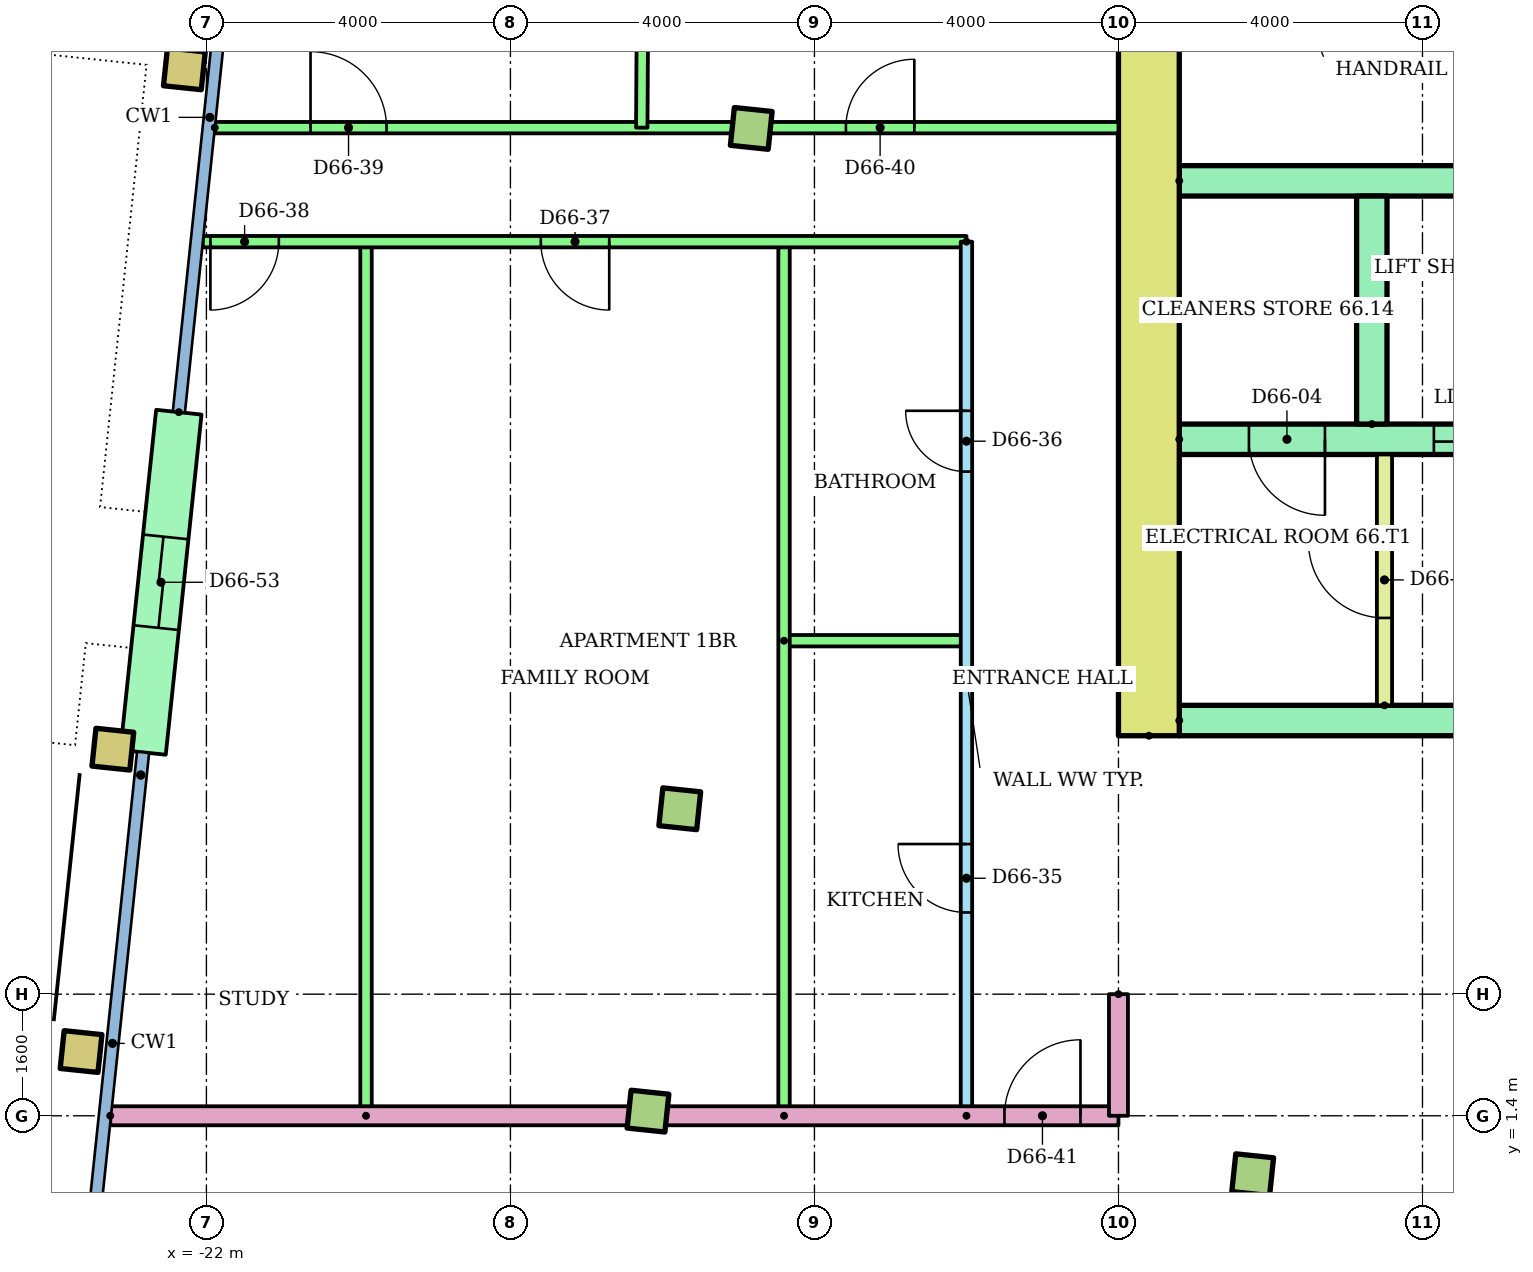
"""IFC4 building model, lengths in metres.
Left out: names, types, materials, properties, quantities, classifications, styles, units other than length and angle.
Written with IfcOpenShell. Run it as: python <this file> out.ifc"""

import sys

from ifc_helpers import new_model, si_unit, direction, frame, frame_2d, origin, origin_2d, place, context, subcontext, project, spatial, rectangle, hollow_rectangle, extrude, element, fill, save


model = new_model("IFC4")
c1 = context("Model", 3, precision=1e-05, world=origin(), true_north=direction((0.0, 1.0)))
c2 = subcontext(c1, "Body", "Model", "MODEL_VIEW")
j1 = project(units=[si_unit("LENGTHUNIT", "METRE"), si_unit("PLANEANGLEUNIT", "RADIAN")], contexts=[c1])
p1 = place(None, origin())
s1 = spatial("IfcSite", under=j1, at=p1, CompositionType="ELEMENT")
p2 = place(p1, origin())
s2 = spatial("IfcBuilding", under=s1, at=p2, CompositionType="ELEMENT")
p3 = place(p2, frame((0.0, 0.0, 256.3)))
s3 = spatial("IfcBuildingStorey", under=s2, at=p3, CompositionType="ELEMENT", Elevation=256.3)
p4 = place(p3, frame((-23.649, 2.245, 0.0), z_axis=(0.0, 0.0, 1.0), x_axis=(0.994521895368, -0.104528463268, 0.0)))
e1 = element("IfcColumn", 1, at=p4, inside=s3, PredefinedType="COLUMN", context=c2, shape_type="SweptSolid", body=[
    extrude(hollow_rectangle(XDim=0.5, YDim=0.5, WallThickness=0.025, at=origin_2d()), origin(), (0.0, 0.0, 1.0), 3.2),
])
for number, where, z_axis, x_axis in (
    (2, (-16.19, 1.461, 0.0), (0.0, 0.0, 1.0), (0.995, -0.105, 0.0)),
    (3, (-8.234, 0.625, 0.0), (0.0, 0.0, 1.0), (0.995, -0.105, 0.0)),
):
    element("IfcColumn", number, at=place(p3, frame(where, z_axis=z_axis, x_axis=x_axis)), inside=s3, PredefinedType="COLUMN", context=c2, shape_type="SweptSolid", body=[
        extrude(rectangle(XDim=0.5, YDim=0.5, at=origin_2d()), origin(), (0.0, 0.0, 1.0), 3.2),
    ])
p5 = place(p3, frame((-23.231, 6.223, 0.0), z_axis=(0.0, 0.0, 1.0), x_axis=(0.994521895368, -0.104528463268, 0.0)))
e4 = element("IfcColumn", 4, at=p5, inside=s3, PredefinedType="COLUMN", context=c2, shape_type="SweptSolid", body=[
    extrude(hollow_rectangle(XDim=0.5, YDim=0.5, WallThickness=0.025, at=origin_2d()), origin(), (0.0, 0.0, 1.0), 3.2),
])
p6 = place(p3, frame((-15.772, 5.439, 0.0), z_axis=(0.0, 0.0, 1.0), x_axis=(0.994521895368, -0.104528463268, 0.0)))
e5 = element("IfcColumn", 5, at=p6, inside=s3, PredefinedType="COLUMN", context=c2, shape_type="SweptSolid", body=[
    extrude(rectangle(XDim=0.5, YDim=0.5, at=origin_2d()), origin(), (0.0, 0.0, 1.0), 3.2),
])
p7 = place(p3, frame((-22.29, 15.174, 0.0), z_axis=(0.0, 0.0, 1.0), x_axis=(0.994521895368, -0.104528463268, 0.0)))
e6 = element("IfcColumn", 6, at=p7, inside=s3, PredefinedType="COLUMN", context=c2, shape_type="SweptSolid", body=[
    extrude(hollow_rectangle(XDim=0.5, YDim=0.5, WallThickness=0.025, at=origin_2d()), origin(), (0.0, 0.0, 1.0), 3.2),
])
p8 = place(p3, frame((-14.831, 14.39, 0.0), z_axis=(0.0, 0.0, 1.0), x_axis=(0.994521895368, -0.104528463268, 0.0)))
e7 = element("IfcColumn", 7, at=p8, inside=s3, PredefinedType="COLUMN", context=c2, shape_type="SweptSolid", body=[
    extrude(rectangle(XDim=0.5, YDim=0.5, at=origin_2d()), origin(), (0.0, 0.0, 1.0), 3.2),
])
p9 = place(p3, frame((-22.363, 10.657, 0.0), z_axis=(0.0, 0.0, 1.0), x_axis=(-0.104492739125, -0.994525649478, 0.0)))
e8 = element("IfcWall", 8, at=p9, inside=s3, PredefinedType="STANDARD", context=c2, shape_type="SweptSolid", body=[
    extrude(rectangle(XDim=4.5, YDim=0.6, at=frame_2d((2.25, 0.0))), origin(), (0.0, 0.0, 1.0), 2.92),
])
p10 = place(p9, frame((1.65, 0.0, 0.0)))
e9 = element("IfcOpeningElement", 9, at=p10, cuts=e8, PredefinedType="OPENING", context=c2, shape_type="SweptSolid", body=[
    extrude(rectangle(XDim=1.2, YDim=2.1, at=frame_2d((0.6, 1.05))), frame((0.0, 0.31, 0.0), z_axis=(0.0, -1.0, 0.0), x_axis=(1.0, 0.0, 0.0)), (0.0, 0.0, 1.0), 0.62),
])
p11 = place(p3, frame((-9.6, 6.4, 0.0), z_axis=(0.0, 0.0, 1.0), x_axis=(0.0, 1.0, 0.0)))
e10 = element("IfcWall", 10, at=p11, inside=s3, PredefinedType="SHEAR", context=c2, shape_type="SweptSolid", body=[
    extrude(rectangle(XDim=13.6, YDim=0.8, at=frame_2d((6.8, 0.0))), origin(), (0.0, 0.0, 1.0), 2.92),
])
p12 = place(p3, frame((-9.2, 6.6, 0.0)))
e11 = element("IfcWall", 11, at=p12, inside=s3, PredefinedType="SHEAR", context=c2, shape_type="SweptSolid", body=[
    extrude(rectangle(XDim=18.4, YDim=0.4, at=frame_2d((9.2, 0.0))), origin(), (0.0, 0.0, 1.0), 2.92),
])
p13 = place(p12, frame((8.3, 0.0, 0.0)))
e12 = element("IfcOpeningElement", 12, at=p13, cuts=e11, PredefinedType="OPENING", context=c2, shape_type="SweptSolid", body=[
    extrude(rectangle(XDim=1.8, YDim=2.1, at=frame_2d((0.9, 1.05))), frame((0.0, 0.21, 0.0), z_axis=(0.0, -1.0, 0.0), x_axis=(1.0, 0.0, 0.0)), (0.0, 0.0, 1.0), 0.42),
])
p14 = place(p12, frame((3.8, 0.0, 0.0)))
e13 = element("IfcOpeningElement", 13, at=p14, cuts=e11, PredefinedType="OPENING", context=c2, shape_type="SweptSolid", body=[
    extrude(rectangle(XDim=1.8, YDim=2.1, at=frame_2d((0.9, 1.05))), frame((0.0, 0.21, 0.0), z_axis=(0.0, -1.0, 0.0), x_axis=(1.0, 0.0, 0.0)), (0.0, 0.0, 1.0), 0.42),
])
p15 = place(p12, frame((12.8, 0.0, 0.0)))
e14 = element("IfcOpeningElement", 14, at=p15, cuts=e11, PredefinedType="OPENING", context=c2, shape_type="SweptSolid", body=[
    extrude(rectangle(XDim=1.8, YDim=2.1, at=frame_2d((0.9, 1.05))), frame((0.0, 0.21, 0.0), z_axis=(0.0, -1.0, 0.0), x_axis=(1.0, 0.0, 0.0)), (0.0, 0.0, 1.0), 0.42),
])
p16 = place(p3, frame((-9.2, 10.3, 0.0)))
e15 = element("IfcWall", 15, at=p16, inside=s3, PredefinedType="SHEAR", context=c2, shape_type="SweptSolid", body=[
    extrude(rectangle(XDim=8.0, YDim=0.4, at=frame_2d((4.0, 0.0))), origin(), (0.0, 0.0, 1.0), 2.92),
])
p17 = place(p16, frame((3.35, 0.0, 0.0)))
e16 = element("IfcOpeningElement", 16, at=p17, cuts=e15, PredefinedType="OPENING", context=c2, shape_type="SweptSolid", body=[
    extrude(rectangle(XDim=1.1, YDim=2.1, at=frame_2d((0.55, 1.05))), frame((0.0, 0.21, 0.0), z_axis=(0.0, -1.0, 0.0), x_axis=(1.0, 0.0, 0.0)), (0.0, 0.0, 1.0), 0.42),
])
p18 = place(p16, frame((6.083, 0.0, 0.0)))
e17 = element("IfcOpeningElement", 17, at=p18, cuts=e15, PredefinedType="OPENING", context=c2, shape_type="SweptSolid", body=[
    extrude(rectangle(XDim=1.1, YDim=2.1, at=frame_2d((0.55, 1.05))), frame((0.0, 0.21, 0.0), z_axis=(0.0, -1.0, 0.0), x_axis=(1.0, 0.0, 0.0)), (0.0, 0.0, 1.0), 0.42),
])
p19 = place(p16, frame((0.917, 0.0, 0.0)))
e18 = element("IfcOpeningElement", 18, at=p19, cuts=e15, PredefinedType="OPENING", context=c2, shape_type="SweptSolid", body=[
    extrude(rectangle(XDim=1.0, YDim=2.1, at=frame_2d((0.5, 1.05))), frame((0.0, 0.21, 0.0), z_axis=(0.0, -1.0, 0.0), x_axis=(1.0, 0.0, 0.0)), (0.0, 0.0, 1.0), 0.42),
])
p20 = place(p3, frame((-9.2, 13.7, 0.0)))
e19 = element("IfcWall", 19, at=p20, inside=s3, PredefinedType="SHEAR", context=c2, shape_type="SweptSolid", body=[
    extrude(rectangle(XDim=8.0, YDim=0.4, at=frame_2d((4.0, 0.0))), origin(), (0.0, 0.0, 1.0), 2.92),
])
p21 = place(p3, frame((-6.667, 10.5, 0.0), z_axis=(0.0, 0.0, 1.0), x_axis=(0.0, 1.0, 0.0)))
e20 = element("IfcWall", 20, at=p21, inside=s3, PredefinedType="SHEAR", context=c2, shape_type="SweptSolid", body=[
    extrude(rectangle(XDim=3.0, YDim=0.4, at=frame_2d((1.5, 0.0))), origin(), (0.0, 0.0, 1.0), 2.92),
])
p22 = place(p3, frame((-6.5, 6.8, 0.0), z_axis=(0.0, 0.0, 1.0), x_axis=(0.0, 1.0, 0.0)))
e21 = element("IfcWall", 21, at=p22, inside=s3, PredefinedType="PARTITIONING", context=c2, shape_type="SweptSolid", body=[
    extrude(rectangle(XDim=3.3, YDim=0.2, at=frame_2d((1.65, 0.0))), origin(), (0.0, 0.0, 1.0), 2.92),
])
p23 = place(p22, frame((1.15, 0.0, 0.0)))
e22 = element("IfcOpeningElement", 22, at=p23, cuts=e21, PredefinedType="OPENING", context=c2, shape_type="SweptSolid", body=[
    extrude(rectangle(XDim=1.0, YDim=2.1, at=frame_2d((0.5, 1.05))), frame((0.0, 0.11, 0.0), z_axis=(0.0, -1.0, 0.0), x_axis=(1.0, 0.0, 0.0)), (0.0, 0.0, 1.0), 0.22),
])
p24 = place(p3, frame((-12.0, 1.4, 0.0), z_axis=(0.0, 0.0, 1.0), x_axis=(0.0, 1.0, 0.0)))
e23 = element("IfcWall", 23, at=p24, inside=s3, PredefinedType="PARTITIONING", context=c2, shape_type="SweptSolid", body=[
    extrude(rectangle(XDim=11.5, YDim=0.15, at=frame_2d((5.75, 0.0))), origin(), (0.0, 0.0, 1.0), 2.4),
])
p25 = place(p24, frame((2.675, 0.0, 0.0)))
e24 = element("IfcOpeningElement", 24, at=p25, cuts=e23, PredefinedType="OPENING", context=c2, shape_type="SweptSolid", body=[
    extrude(rectangle(XDim=0.9, YDim=2.1, at=frame_2d((0.45, 1.05))), frame((0.0, 0.085, 0.0), z_axis=(0.0, -1.0, 0.0), x_axis=(1.0, 0.0, 0.0)), (0.0, 0.0, 1.0), 0.17),
])
p26 = place(p24, frame((8.475, 0.0, 0.0)))
e25 = element("IfcOpeningElement", 25, at=p26, cuts=e23, PredefinedType="OPENING", context=c2, shape_type="SweptSolid", body=[
    extrude(rectangle(XDim=0.8, YDim=2.1, at=frame_2d((0.4, 1.05))), frame((0.0, 0.085, 0.0), z_axis=(0.0, -1.0, 0.0), x_axis=(1.0, 0.0, 0.0)), (0.0, 0.0, 1.0), 0.17),
])
p27 = place(p3, frame((-14.4, 7.65, 0.0)))
e26 = element("IfcWall", 26, at=p27, inside=s3, PredefinedType="PARTITIONING", context=c2, shape_type="SweptSolid", body=[
    extrude(rectangle(XDim=2.4, YDim=0.15, at=frame_2d((1.2, 0.0))), origin(), (0.0, 0.0, 1.0), 2.4),
])
for number, where, z_axis, x_axis in (
    (27, (-14.4, 1.4, 0.0), (0.0, 0.0, 1.0), (0.0, 1.0, 0.0)),
    (28, (-19.9, 1.4, 0.0), (0.0, 0.0, 1.0), (0.0, 1.0, 0.0)),
):
    element("IfcWall", number, at=place(p3, frame(where, z_axis=z_axis, x_axis=x_axis)), inside=s3, PredefinedType="PARTITIONING", context=c2, shape_type="SweptSolid", body=[
        extrude(rectangle(XDim=11.5, YDim=0.15, at=frame_2d((5.75, 0.0))), origin(), (0.0, 0.0, 1.0), 2.4),
    ])
p28 = place(p3, frame((-12.0, 12.9, 0.0), z_axis=(0.0, 0.0, 1.0), x_axis=(-1.0, 0.0, 0.0)))
e29 = element("IfcWall", 29, at=p28, inside=s3, PredefinedType="PARTITIONING", context=c2, shape_type="SweptSolid", body=[
    extrude(rectangle(XDim=10.047, YDim=0.15, at=frame_2d((5.024, 0.0))), origin(), (0.0, 0.0, 1.0), 2.4),
])
p29 = place(p28, frame((4.7, 0.0, 0.0)))
e30 = element("IfcOpeningElement", 30, at=p29, cuts=e29, PredefinedType="OPENING", context=c2, shape_type="SweptSolid", body=[
    extrude(rectangle(XDim=0.9, YDim=2.1, at=frame_2d((0.45, 1.05))), frame((0.0, 0.085, 0.0), z_axis=(0.0, -1.0, 0.0), x_axis=(1.0, 0.0, 0.0)), (0.0, 0.0, 1.0), 0.17),
])
p30 = place(p28, frame((9.047, 0.0, 0.0)))
e31 = element("IfcOpeningElement", 31, at=p30, cuts=e29, PredefinedType="OPENING", context=c2, shape_type="SweptSolid", body=[
    extrude(rectangle(XDim=0.9, YDim=2.1, at=frame_2d((0.45, 1.05))), frame((0.0, 0.085, 0.0), z_axis=(0.0, -1.0, 0.0), x_axis=(1.0, 0.0, 0.0)), (0.0, 0.0, 1.0), 0.17),
])
p31 = place(p3, frame((-21.89, 14.4, 0.0)))
e32 = element("IfcWall", 32, at=p31, inside=s3, PredefinedType="PARTITIONING", context=c2, shape_type="SweptSolid", body=[
    extrude(rectangle(XDim=11.89, YDim=0.15, at=frame_2d((5.945, 0.0))), origin(), (0.0, 0.0, 1.0), 2.4),
])
p32 = place(p31, frame((1.26, 0.0, 0.0)))
e33 = element("IfcOpeningElement", 33, at=p32, cuts=e32, PredefinedType="OPENING", context=c2, shape_type="SweptSolid", body=[
    extrude(rectangle(XDim=1.0, YDim=2.1, at=frame_2d((0.5, 1.05))), frame((0.0, 0.085, 0.0), z_axis=(0.0, -1.0, 0.0), x_axis=(1.0, 0.0, 0.0)), (0.0, 0.0, 1.0), 0.17),
])
p33 = place(p31, frame((8.304, 0.0, 0.0)))
e34 = element("IfcOpeningElement", 34, at=p33, cuts=e32, PredefinedType="OPENING", context=c2, shape_type="SweptSolid", body=[
    extrude(rectangle(XDim=0.9, YDim=2.1, at=frame_2d((0.45, 1.05))), frame((0.0, 0.085, 0.0), z_axis=(0.0, -1.0, 0.0), x_axis=(1.0, 0.0, 0.0)), (0.0, 0.0, 1.0), 0.17),
])
p34 = place(p3, frame((-16.222, 22.61, 0.0), z_axis=(0.0, 0.0, 1.0), x_axis=(-0.006095634594, -0.999981421447, 0.0)))
e35 = element("IfcWall", 35, at=p34, inside=s3, PredefinedType="PARTITIONING", context=c2, shape_type="SweptSolid", body=[
    extrude(rectangle(XDim=8.211, YDim=0.15, at=frame_2d((4.105, 0.0))), origin(), (0.0, 0.0, 1.0), 2.4),
])
p35 = place(p3, frame((-23.265, 1.4, 0.0)))
e36 = element("IfcWall", 36, at=p35, inside=s3, PredefinedType="PARTITIONING", context=c2, shape_type="SweptSolid", body=[
    extrude(rectangle(XDim=13.265, YDim=0.25, at=frame_2d((6.633, 0.0))), origin(), (0.0, 0.0, 1.0), 2.4),
])
p36 = place(p35, frame((11.765, 0.0, 0.0)))
e37 = element("IfcOpeningElement", 37, at=p36, cuts=e36, PredefinedType="OPENING", context=c2, shape_type="SweptSolid", body=[
    extrude(rectangle(XDim=1.0, YDim=2.1, at=frame_2d((0.5, 1.05))), frame((0.0, 0.135, 0.0), z_axis=(0.0, -1.0, 0.0), x_axis=(1.0, 0.0, 0.0)), (0.0, 0.0, 1.0), 0.27),
])
p37 = place(p3, frame((-10.0, 3.0, 0.0), z_axis=(0.0, 0.0, 1.0), x_axis=(0.0, -1.0, 0.0)))
e38 = element("IfcWall", 38, at=p37, inside=s3, PredefinedType="PARTITIONING", context=c2, shape_type="SweptSolid", body=[
    extrude(rectangle(XDim=1.6, YDim=0.25, at=frame_2d((0.8, 0.0))), origin(), (0.0, 0.0, 1.0), 2.4),
])
p38 = place(p17, origin())
e39 = element("IfcDoor", 39, at=p38, inside=s3, OperationType="SLIDING_TO_LEFT", PredefinedType="DOOR", context=c2, shape_type="SweptSolid", body=[
    extrude(rectangle(XDim=1.1, YDim=2.1, at=frame_2d((0.55, 1.05))), frame((0.0, 0.025, 0.0), z_axis=(0.0, -1.0, 0.0), x_axis=(1.0, 0.0, 0.0)), (0.0, 0.0, 1.0), 0.05),
])
fill(e16, e39)
p39 = place(p19, frame((1.0, 0.0, 0.0), z_axis=(0.0, 0.0, 1.0), x_axis=(-1.0, 0.0, 0.0)))
e40 = element("IfcDoor", 40, at=p39, inside=s3, OperationType="SINGLE_SWING_RIGHT", PredefinedType="DOOR", context=c2, shape_type="SweptSolid", body=[
    extrude(rectangle(XDim=1.0, YDim=2.1, at=frame_2d((0.5, 1.05))), frame((0.0, 0.025, 0.0), z_axis=(0.0, -1.0, 0.0), x_axis=(1.0, 0.0, 0.0)), (0.0, 0.0, 1.0), 0.05),
])
fill(e18, e40)
p40 = place(p23, origin())
e41 = element("IfcDoor", 41, at=p40, inside=s3, OperationType="SINGLE_SWING_RIGHT", PredefinedType="DOOR", context=c2, shape_type="SweptSolid", body=[
    extrude(rectangle(XDim=1.0, YDim=2.1, at=frame_2d((0.5, 1.05))), frame((0.0, 0.025, 0.0), z_axis=(0.0, -1.0, 0.0), x_axis=(1.0, 0.0, 0.0)), (0.0, 0.0, 1.0), 0.05),
])
fill(e22, e41)
p41 = place(p25, origin())
e42 = element("IfcDoor", 42, at=p41, inside=s3, OperationType="SINGLE_SWING_RIGHT", PredefinedType="DOOR", context=c2, shape_type="SweptSolid", body=[
    extrude(rectangle(XDim=0.9, YDim=2.1, at=frame_2d((0.45, 1.05))), frame((0.0, 0.025, 0.0), z_axis=(0.0, -1.0, 0.0), x_axis=(1.0, 0.0, 0.0)), (0.0, 0.0, 1.0), 0.05),
])
fill(e24, e42)
p42 = place(p26, origin())
e43 = element("IfcDoor", 43, at=p42, inside=s3, OperationType="SINGLE_SWING_RIGHT", PredefinedType="DOOR", context=c2, shape_type="SweptSolid", body=[
    extrude(rectangle(XDim=0.8, YDim=2.1, at=frame_2d((0.4, 1.05))), frame((0.0, 0.025, 0.0), z_axis=(0.0, -1.0, 0.0), x_axis=(1.0, 0.0, 0.0)), (0.0, 0.0, 1.0), 0.05),
])
fill(e25, e43)
p43 = place(p29, origin())
e44 = element("IfcDoor", 44, at=p43, inside=s3, OperationType="SINGLE_SWING_LEFT", PredefinedType="DOOR", context=c2, shape_type="SweptSolid", body=[
    extrude(rectangle(XDim=0.9, YDim=2.1, at=frame_2d((0.45, 1.05))), frame((0.0, 0.025, 0.0), z_axis=(0.0, -1.0, 0.0), x_axis=(1.0, 0.0, 0.0)), (0.0, 0.0, 1.0), 0.05),
])
fill(e30, e44)
p44 = place(p30, origin())
e45 = element("IfcDoor", 45, at=p44, inside=s3, OperationType="SINGLE_SWING_RIGHT", PredefinedType="DOOR", context=c2, shape_type="SweptSolid", body=[
    extrude(rectangle(XDim=0.9, YDim=2.1, at=frame_2d((0.45, 1.05))), frame((0.0, 0.025, 0.0), z_axis=(0.0, -1.0, 0.0), x_axis=(1.0, 0.0, 0.0)), (0.0, 0.0, 1.0), 0.05),
])
fill(e31, e45)
p45 = place(p32, origin())
e46 = element("IfcDoor", 46, at=p45, inside=s3, OperationType="SINGLE_SWING_LEFT", PredefinedType="DOOR", context=c2, shape_type="SweptSolid", body=[
    extrude(rectangle(XDim=1.0, YDim=2.1, at=frame_2d((0.5, 1.05))), frame((0.0, 0.025, 0.0), z_axis=(0.0, -1.0, 0.0), x_axis=(1.0, 0.0, 0.0)), (0.0, 0.0, 1.0), 0.05),
])
fill(e33, e46)
p46 = place(p33, origin())
e47 = element("IfcDoor", 47, at=p46, inside=s3, OperationType="SINGLE_SWING_RIGHT", PredefinedType="DOOR", context=c2, shape_type="SweptSolid", body=[
    extrude(rectangle(XDim=0.9, YDim=2.1, at=frame_2d((0.45, 1.05))), frame((0.0, 0.025, 0.0), z_axis=(0.0, -1.0, 0.0), x_axis=(1.0, 0.0, 0.0)), (0.0, 0.0, 1.0), 0.05),
])
fill(e34, e47)
p47 = place(p36, origin())
e48 = element("IfcDoor", 48, at=p47, inside=s3, OperationType="SINGLE_SWING_RIGHT", PredefinedType="DOOR", context=c2, shape_type="SweptSolid", body=[
    extrude(rectangle(XDim=1.0, YDim=2.1, at=frame_2d((0.5, 1.05))), frame((0.0, 0.025, 0.0), z_axis=(0.0, -1.0, 0.0), x_axis=(1.0, 0.0, 0.0)), (0.0, 0.0, 1.0), 0.05),
])
fill(e37, e48)
p48 = place(p10, origin())
e49 = element("IfcDoor", 49, at=p48, inside=s3, OperationType="SLIDING_TO_LEFT", PredefinedType="DOOR", context=c2, shape_type="SweptSolid", body=[
    extrude(rectangle(XDim=1.2, YDim=2.1, at=frame_2d((0.6, 1.05))), frame((0.0, 0.025, 0.0), z_axis=(0.0, -1.0, 0.0), x_axis=(1.0, 0.0, 0.0)), (0.0, 0.0, 1.0), 0.05),
])
fill(e9, e49)
save(model, sys.argv[1])
